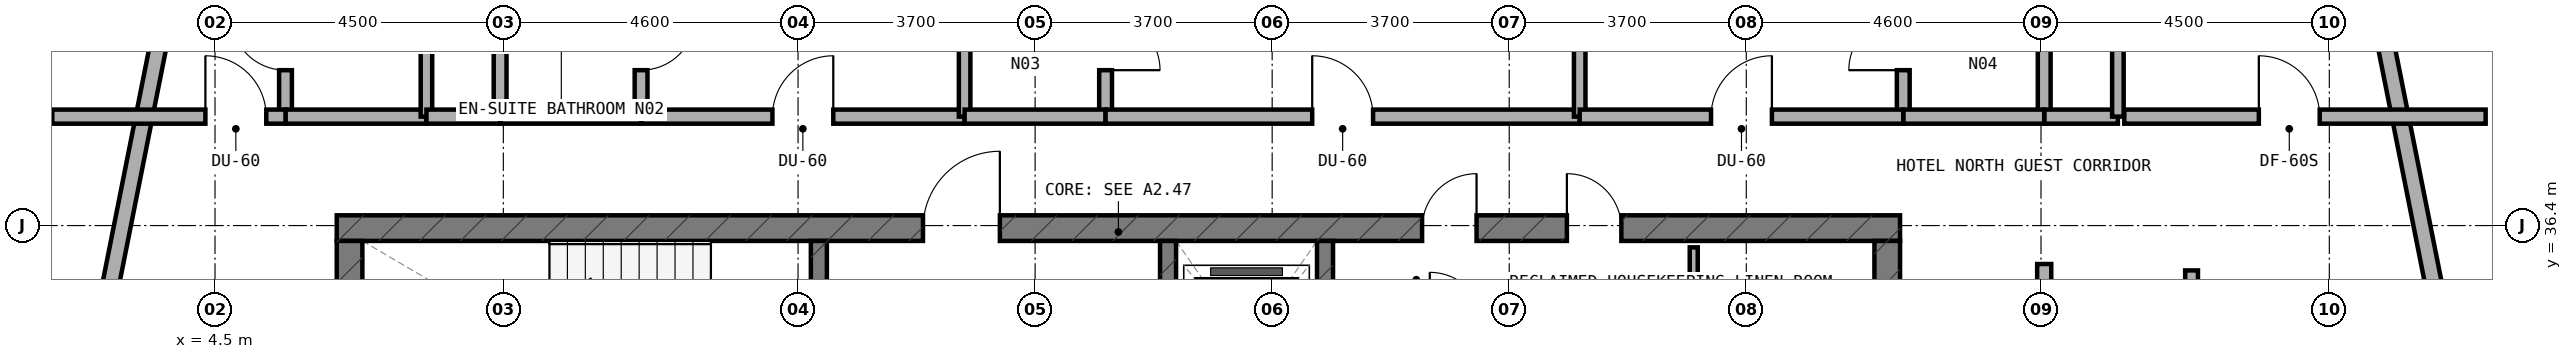
"""IFC4 building model, lengths in metres.
Left out: names, types, materials, properties, quantities, classifications, styles, units other than length and angle.
Written with IfcOpenShell. Run it as: python <this file> out.ifc"""

import sys

from ifc_helpers import new_model, si_unit, direction, frame, frame_2d, origin, place, context, subcontext, project, spatial, rectangle, extrude, element, fill, save


model = new_model("IFC4")
c1 = context("Model", 3, precision=1e-05, world=origin(), true_north=direction((0.0, 1.0)))
c2 = subcontext(c1, "Body", "Model", "MODEL_VIEW")
j1 = project(units=[si_unit("LENGTHUNIT", "METRE"), si_unit("PLANEANGLEUNIT", "RADIAN")], contexts=[c1])
p1 = place(None, origin())
s1 = spatial("IfcSite", under=j1, at=p1, CompositionType="ELEMENT")
p2 = place(p1, origin())
s2 = spatial("IfcBuilding", under=s1, at=p2, CompositionType="ELEMENT")
p3 = place(p2, frame((0.0, 0.0, 220.7)))
s3 = spatial("IfcBuildingStorey", under=s2, at=p3, CompositionType="ELEMENT", Elevation=220.7)
p4 = place(p3, frame((6.4, 36.36, 0.0), z_axis=(0.0, 0.0, 1.0), x_axis=(1.0, 0.0, 0.0)))
e1 = element("IfcWall", 1, at=p4, inside=s3, PredefinedType="SHEAR", context=c2, shape_type="SweptSolid", body=[
    extrude(rectangle(XDim=24.4, YDim=0.4, at=frame_2d((12.2, 0.0))), origin(), (0.0, 0.0, 1.0), 3.6),
])
p5 = place(p4, frame((9.15, 0.0, 0.0)))
e2 = element("IfcOpeningElement", 2, at=p5, cuts=e1, PredefinedType="OPENING", context=c2, shape_type="SweptSolid", body=[
    extrude(rectangle(XDim=1.2, YDim=2.15, at=frame_2d((0.6, 1.075))), frame((0.0, 0.21, 0.0), z_axis=(0.0, -1.0, 0.0), x_axis=(1.0, 0.0, 0.0)), (0.0, 0.0, 1.0), 0.42),
])
p6 = place(p4, frame((19.2, 0.0, 0.0)))
e3 = element("IfcOpeningElement", 3, at=p6, cuts=e1, PredefinedType="OPENING", context=c2, shape_type="SweptSolid", body=[
    extrude(rectangle(XDim=0.85, YDim=2.1, at=frame_2d((0.425, 1.05))), frame((0.0, 0.21, 0.0), z_axis=(0.0, -1.0, 0.0), x_axis=(1.0, 0.0, 0.0)), (0.0, 0.0, 1.0), 0.42),
])
p7 = place(p4, frame((16.94, 0.0, 0.0)))
e4 = element("IfcOpeningElement", 4, at=p7, cuts=e1, PredefinedType="OPENING", context=c2, shape_type="SweptSolid", body=[
    extrude(rectangle(XDim=0.85, YDim=2.1, at=frame_2d((0.425, 1.05))), frame((0.0, 0.21, 0.0), z_axis=(0.0, -1.0, 0.0), x_axis=(1.0, 0.0, 0.0)), (0.0, 0.0, 1.0), 0.42),
])
for number, where, z_axis, x_axis in (
    (5, (6.6, 33.0, 0.0), (0.0, 0.0, 1.0), (0.0, 1.0, 0.0)),
    (6, (30.6, 33.0, 0.0), (0.0, 0.0, 1.0), (0.0, 1.0, 0.0)),
):
    element("IfcWall", number, at=place(p3, frame(where, z_axis=z_axis, x_axis=x_axis)), inside=s3, PredefinedType="SHEAR", context=c2, shape_type="SweptSolid", body=[
        extrude(rectangle(XDim=3.16, YDim=0.4, at=frame_2d((1.58, 0.0))), origin(), (0.0, 0.0, 1.0), 3.6),
    ])
p8 = place(p3, frame((13.925, 33.0, 0.0), z_axis=(0.0, 0.0, 1.0), x_axis=(0.0, 1.0, 0.0)))
e7 = element("IfcWall", 7, at=p8, inside=s3, PredefinedType="STANDARD", context=c2, shape_type="SweptSolid", body=[
    extrude(rectangle(XDim=3.16, YDim=0.25, at=frame_2d((1.58, 0.0))), origin(), (0.0, 0.0, 1.0), 3.32),
])
p9 = place(p8, frame((0.98, 0.0, 0.0)))
e8 = element("IfcOpeningElement", 8, at=p9, cuts=e7, PredefinedType="OPENING", context=c2, shape_type="SweptSolid", body=[
    extrude(rectangle(XDim=1.1, YDim=2.15, at=frame_2d((0.55, 1.075))), frame((0.0, 0.135, 0.0), z_axis=(0.0, -1.0, 0.0), x_axis=(1.0, 0.0, 0.0)), (0.0, 0.0, 1.0), 0.27),
])
p10 = place(p3, frame((19.375, 33.0, 0.0), z_axis=(0.0, 0.0, 1.0), x_axis=(0.0, 1.0, 0.0)))
e9 = element("IfcWall", 9, at=p10, inside=s3, PredefinedType="STANDARD", context=c2, shape_type="SweptSolid", body=[
    extrude(rectangle(XDim=3.16, YDim=0.25, at=frame_2d((1.58, 0.0))), origin(), (0.0, 0.0, 1.0), 3.32),
])
p11 = place(p10, frame((0.98, 0.0, 0.0)))
e10 = element("IfcOpeningElement", 10, at=p11, cuts=e9, PredefinedType="OPENING", context=c2, shape_type="SweptSolid", body=[
    extrude(rectangle(XDim=1.1, YDim=2.15, at=frame_2d((0.55, 1.075))), frame((0.0, 0.135, 0.0), z_axis=(0.0, -1.0, 0.0), x_axis=(1.0, 0.0, 0.0)), (0.0, 0.0, 1.0), 0.27),
])
p12 = place(p3, frame((21.825, 33.0, 0.0), z_axis=(0.0, 0.0, 1.0), x_axis=(0.0, 1.0, 0.0)))
e11 = element("IfcWall", 11, at=p12, inside=s3, PredefinedType="STANDARD", context=c2, shape_type="SweptSolid", body=[
    extrude(rectangle(XDim=3.16, YDim=0.25, at=frame_2d((1.58, 0.0))), origin(), (0.0, 0.0, 1.0), 3.32),
])
p13 = place(p3, frame((40.084, 30.681, 0.0), z_axis=(0.0, 0.0, 1.0), x_axis=(-0.195291715883, 0.980745199176, 0.0)))
e12 = element("IfcWall", 12, at=p13, inside=s3, PredefinedType="STANDARD", context=c2, shape_type="SweptSolid", body=[
    extrude(rectangle(XDim=8.771, YDim=0.26, at=frame_2d((4.385, 0.0))), origin(), (0.0, 0.0, 1.0), 3.32),
])
p14 = place(p13, frame((2.67, 0.0, 0.85)))
e13 = element("IfcOpeningElement", 13, at=p14, cuts=e12, PredefinedType="OPENING", context=c2, shape_type="SweptSolid", body=[
    extrude(rectangle(XDim=2.1, YDim=1.5, at=frame_2d((1.05, 0.75))), frame((0.0, 0.14, 0.0), z_axis=(0.0, -1.0, 0.0), x_axis=(1.0, 0.0, 0.0)), (0.0, 0.0, 1.0), 0.28),
])
p15 = place(p3, frame((3.629, 39.283, 0.0), z_axis=(0.0, 0.0, 1.0), x_axis=(-0.195291715883, -0.980745199176, 0.0)))
e14 = element("IfcWall", 14, at=p15, inside=s3, PredefinedType="STANDARD", context=c2, shape_type="SweptSolid", body=[
    extrude(rectangle(XDim=8.771, YDim=0.26, at=frame_2d((4.385, 0.0))), origin(), (0.0, 0.0, 1.0), 3.32),
])
p16 = place(p15, frame((4.0, 0.0, 0.85)))
e15 = element("IfcOpeningElement", 15, at=p16, cuts=e14, PredefinedType="OPENING", context=c2, shape_type="SweptSolid", body=[
    extrude(rectangle(XDim=2.1, YDim=1.5, at=frame_2d((1.05, 0.75))), frame((0.0, 0.14, 0.0), z_axis=(0.0, -1.0, 0.0), x_axis=(1.0, 0.0, 0.0)), (0.0, 0.0, 1.0), 0.28),
])
p17 = place(p3, frame((27.58, 33.1, 0.0), z_axis=(0.0, 0.0, 1.0), x_axis=(0.0, 1.0, 0.0)))
e16 = element("IfcWall", 16, at=p17, inside=s3, PredefinedType="PARTITIONING", context=c2, shape_type="SweptSolid", body=[
    extrude(rectangle(XDim=2.96, YDim=0.125, at=frame_2d((1.48, 0.0))), origin(), (0.0, 0.0, 1.0), 3.32),
])
p18 = place(p17, frame((1.055, 0.0, 0.0)))
e17 = element("IfcOpeningElement", 17, at=p18, cuts=e16, PredefinedType="OPENING", context=c2, shape_type="SweptSolid", body=[
    extrude(rectangle(XDim=0.85, YDim=2.1, at=frame_2d((0.425, 1.05))), frame((0.0, 0.073, 0.0), z_axis=(0.0, -1.0, 0.0), x_axis=(1.0, 0.0, 0.0)), (0.0, 0.0, 1.0), 0.145),
])
p19 = place(p3, frame((5.6, 38.2, 0.0), z_axis=(0.0, 0.0, 1.0), x_axis=(0.0, 1.0, 0.0)))
e18 = element("IfcWall", 18, at=p19, inside=s3, PredefinedType="PLUMBINGWALL", context=c2, shape_type="SweptSolid", body=[
    extrude(rectangle(XDim=2.1, YDim=0.2, at=frame_2d((1.05, 0.0))), origin(), (0.0, 0.0, 1.0), 3.32),
])
p20 = place(p19, frame((0.625, 0.0, 0.0)))
e19 = element("IfcOpeningElement", 19, at=p20, cuts=e18, PredefinedType="OPENING", context=c2, shape_type="SweptSolid", body=[
    extrude(rectangle(XDim=0.85, YDim=2.1, at=frame_2d((0.425, 1.05))), frame((0.0, 0.11, 0.0), z_axis=(0.0, -1.0, 0.0), x_axis=(1.0, 0.0, 0.0)), (0.0, 0.0, 1.0), 0.22),
])
p21 = place(p3, frame((5.6, 38.1, 0.0), z_axis=(0.0, 0.0, 1.0), x_axis=(1.0, 0.0, 0.0)))
e20 = element("IfcWall", 20, at=p21, inside=s3, PredefinedType="SOLIDWALL", context=c2, shape_type="SweptSolid", body=[
    extrude(rectangle(XDim=2.2, YDim=0.22, at=frame_2d((1.1, 0.0))), origin(), (0.0, 0.0, 1.0), 2.695),
])
p22 = place(p3, frame((1.96, 38.1, 0.0), z_axis=(0.0, 0.0, 1.0), x_axis=(1.0, 0.0, 0.0)))
e21 = element("IfcWall", 21, at=p22, inside=s3, PredefinedType="SOLIDWALL", context=c2, shape_type="SweptSolid", body=[
    extrude(rectangle(XDim=3.64, YDim=0.22, at=frame_2d((1.82, 0.0))), origin(), (0.0, 0.0, 1.0), 3.32),
])
p23 = place(p22, frame((2.39, 0.0, 0.0)))
e22 = element("IfcOpeningElement", 22, at=p23, cuts=e21, PredefinedType="OPENING", context=c2, shape_type="SweptSolid", body=[
    extrude(rectangle(XDim=0.95, YDim=2.1, at=frame_2d((0.475, 1.05))), frame((0.0, 0.12, 0.0), z_axis=(0.0, -1.0, 0.0), x_axis=(1.0, 0.0, 0.0)), (0.0, 0.0, 1.0), 0.24),
])
p24 = place(p3, frame((7.8, 38.1, 0.0), z_axis=(0.0, 0.0, 1.0), x_axis=(0.0, 1.0, 0.0)))
e23 = element("IfcWall", 23, at=p24, inside=s3, PredefinedType="SOLIDWALL", context=c2, shape_type="SweptSolid", body=[
    extrude(rectangle(XDim=4.558, YDim=0.18, at=frame_2d((2.279, 0.0))), origin(), (0.0, 0.0, 1.0), 2.695),
])
p25 = place(p3, frame((11.15, 38.2, 0.0), z_axis=(0.0, 0.0, 1.0), x_axis=(0.0, 1.0, 0.0)))
e24 = element("IfcWall", 24, at=p25, inside=s3, PredefinedType="PLUMBINGWALL", context=c2, shape_type="SweptSolid", body=[
    extrude(rectangle(XDim=2.1, YDim=0.2, at=frame_2d((1.05, 0.0))), origin(), (0.0, 0.0, 1.0), 3.015),
])
p26 = place(p25, frame((0.625, 0.0, 0.0)))
e25 = element("IfcOpeningElement", 25, at=p26, cuts=e24, PredefinedType="OPENING", context=c2, shape_type="SweptSolid", body=[
    extrude(rectangle(XDim=0.85, YDim=2.1, at=frame_2d((0.425, 1.05))), frame((0.0, 0.11, 0.0), z_axis=(0.0, -1.0, 0.0), x_axis=(1.0, 0.0, 0.0)), (0.0, 0.0, 1.0), 0.22),
])
p27 = place(p3, frame((8.95, 38.2, 0.0), z_axis=(0.0, 0.0, 1.0), x_axis=(0.0, 1.0, 0.0)))
e26 = element("IfcWall", 26, at=p27, inside=s3, PredefinedType="PLUMBINGWALL", context=c2, shape_type="SweptSolid", body=[
    extrude(rectangle(XDim=2.1, YDim=0.2, at=frame_2d((1.05, 0.0))), origin(), (0.0, 0.0, 1.0), 3.015),
])
p28 = place(p3, frame((7.8, 38.1, 0.0), z_axis=(0.0, 0.0, 1.0), x_axis=(1.0, 0.0, 0.0)))
e27 = element("IfcWall", 27, at=p28, inside=s3, PredefinedType="SOLIDWALL", context=c2, shape_type="SweptSolid", body=[
    extrude(rectangle(XDim=1.15, YDim=0.22, at=frame_2d((0.575, 0.0))), origin(), (0.0, 0.0, 1.0), 2.695),
])
p29 = place(p3, frame((8.95, 38.1, 0.0), z_axis=(0.0, 0.0, 1.0), x_axis=(1.0, 0.0, 0.0)))
e28 = element("IfcWall", 28, at=p29, inside=s3, PredefinedType="SOLIDWALL", context=c2, shape_type="SweptSolid", body=[
    extrude(rectangle(XDim=2.2, YDim=0.22, at=frame_2d((1.1, 0.0))), origin(), (0.0, 0.0, 1.0), 3.32),
])
p30 = place(p3, frame((11.15, 38.1, 0.0), z_axis=(0.0, 0.0, 1.0), x_axis=(1.0, 0.0, 0.0)))
e29 = element("IfcWall", 29, at=p30, inside=s3, PredefinedType="SOLIDWALL", context=c2, shape_type="SweptSolid", body=[
    extrude(rectangle(XDim=5.05, YDim=0.22, at=frame_2d((2.525, 0.0))), origin(), (0.0, 0.0, 1.0), 2.695),
])
p31 = place(p30, frame((2.05, 0.0, 0.0)))
e30 = element("IfcOpeningElement", 30, at=p31, cuts=e29, PredefinedType="OPENING", context=c2, shape_type="SweptSolid", body=[
    extrude(rectangle(XDim=0.95, YDim=2.1, at=frame_2d((0.475, 1.05))), frame((0.0, 0.12, 0.0), z_axis=(0.0, -1.0, 0.0), x_axis=(1.0, 0.0, 0.0)), (0.0, 0.0, 1.0), 0.24),
])
p32 = place(p3, frame((16.2, 38.1, 0.0), z_axis=(0.0, 0.0, 1.0), x_axis=(0.0, 1.0, 0.0)))
e31 = element("IfcWall", 31, at=p32, inside=s3, PredefinedType="SOLIDWALL", context=c2, shape_type="SweptSolid", body=[
    extrude(rectangle(XDim=6.04, YDim=0.18, at=frame_2d((3.02, 0.0))), origin(), (0.0, 0.0, 1.0), 2.695),
])
p33 = place(p3, frame((18.4, 38.2, 0.0), z_axis=(0.0, 0.0, 1.0), x_axis=(0.0, 1.0, 0.0)))
e32 = element("IfcWall", 32, at=p33, inside=s3, PredefinedType="PLUMBINGWALL", context=c2, shape_type="SweptSolid", body=[
    extrude(rectangle(XDim=2.1, YDim=0.2, at=frame_2d((1.05, 0.0))), origin(), (0.0, 0.0, 1.0), 3.025),
])
p34 = place(p33, frame((0.625, 0.0, 0.0)))
e33 = element("IfcOpeningElement", 33, at=p34, cuts=e32, PredefinedType="OPENING", context=c2, shape_type="SweptSolid", body=[
    extrude(rectangle(XDim=0.85, YDim=2.1, at=frame_2d((0.425, 1.05))), frame((0.0, 0.11, 0.0), z_axis=(0.0, -1.0, 0.0), x_axis=(1.0, 0.0, 0.0)), (0.0, 0.0, 1.0), 0.22),
])
p35 = place(p3, frame((16.2, 38.1, 0.0), z_axis=(0.0, 0.0, 1.0), x_axis=(1.0, 0.0, 0.0)))
e34 = element("IfcWall", 34, at=p35, inside=s3, PredefinedType="SOLIDWALL", context=c2, shape_type="SweptSolid", body=[
    extrude(rectangle(XDim=2.2, YDim=0.22, at=frame_2d((1.1, 0.0))), origin(), (0.0, 0.0, 1.0), 2.695),
])
p36 = place(p3, frame((18.4, 38.1, 0.0), z_axis=(0.0, 0.0, 1.0), x_axis=(1.0, 0.0, 0.0)))
e35 = element("IfcWall", 35, at=p36, inside=s3, PredefinedType="SOLIDWALL", context=c2, shape_type="SweptSolid", body=[
    extrude(rectangle(XDim=7.4, YDim=0.22, at=frame_2d((3.7, 0.0))), origin(), (0.0, 0.0, 1.0), 2.695),
])
p37 = place(p36, frame((3.225, 0.0, 0.0)))
e36 = element("IfcOpeningElement", 36, at=p37, cuts=e35, PredefinedType="OPENING", context=c2, shape_type="SweptSolid", body=[
    extrude(rectangle(XDim=0.95, YDim=2.1, at=frame_2d((0.475, 1.05))), frame((0.0, 0.12, 0.0), z_axis=(0.0, -1.0, 0.0), x_axis=(1.0, 0.0, 0.0)), (0.0, 0.0, 1.0), 0.24),
])
p38 = place(p3, frame((25.8, 38.1, 0.0), z_axis=(0.0, 0.0, 1.0), x_axis=(0.0, 1.0, 0.0)))
e37 = element("IfcWall", 37, at=p38, inside=s3, PredefinedType="SOLIDWALL", context=c2, shape_type="SweptSolid", body=[
    extrude(rectangle(XDim=6.04, YDim=0.18, at=frame_2d((3.02, 0.0))), origin(), (0.0, 0.0, 1.0), 2.695),
])
p39 = place(p3, frame((30.85, 38.2, 0.0), z_axis=(0.0, 0.0, 1.0), x_axis=(0.0, 1.0, 0.0)))
e38 = element("IfcWall", 38, at=p39, inside=s3, PredefinedType="PLUMBINGWALL", context=c2, shape_type="SweptSolid", body=[
    extrude(rectangle(XDim=2.1, YDim=0.2, at=frame_2d((1.05, 0.0))), origin(), (0.0, 0.0, 1.0), 3.015),
])
p40 = place(p39, frame((0.625, 0.0, 0.0)))
e39 = element("IfcOpeningElement", 39, at=p40, cuts=e38, PredefinedType="OPENING", context=c2, shape_type="SweptSolid", body=[
    extrude(rectangle(XDim=0.85, YDim=2.1, at=frame_2d((0.425, 1.05))), frame((0.0, 0.11, 0.0), z_axis=(0.0, -1.0, 0.0), x_axis=(1.0, 0.0, 0.0)), (0.0, 0.0, 1.0), 0.22),
])
p41 = place(p3, frame((33.05, 38.2, 0.0), z_axis=(0.0, 0.0, 1.0), x_axis=(0.0, 1.0, 0.0)))
e40 = element("IfcWall", 40, at=p41, inside=s3, PredefinedType="PLUMBINGWALL", context=c2, shape_type="SweptSolid", body=[
    extrude(rectangle(XDim=2.1, YDim=0.2, at=frame_2d((1.05, 0.0))), origin(), (0.0, 0.0, 1.0), 3.015),
])
p42 = place(p3, frame((33.05, 38.1, 0.0), z_axis=(0.0, 0.0, 1.0), x_axis=(1.0, 0.0, 0.0)))
e41 = element("IfcWall", 41, at=p42, inside=s3, PredefinedType="SOLIDWALL", context=c2, shape_type="SweptSolid", body=[
    extrude(rectangle(XDim=1.15, YDim=0.22, at=frame_2d((0.575, 0.0))), origin(), (0.0, 0.0, 1.0), 2.695),
])
p43 = place(p3, frame((30.85, 38.1, 0.0), z_axis=(0.0, 0.0, 1.0), x_axis=(1.0, 0.0, 0.0)))
e42 = element("IfcWall", 42, at=p43, inside=s3, PredefinedType="SOLIDWALL", context=c2, shape_type="SweptSolid", body=[
    extrude(rectangle(XDim=2.2, YDim=0.22, at=frame_2d((1.1, 0.0))), origin(), (0.0, 0.0, 1.0), 3.32),
])
p44 = place(p3, frame((25.8, 38.1, 0.0), z_axis=(0.0, 0.0, 1.0), x_axis=(1.0, 0.0, 0.0)))
e43 = element("IfcWall", 43, at=p44, inside=s3, PredefinedType="SOLIDWALL", context=c2, shape_type="SweptSolid", body=[
    extrude(rectangle(XDim=5.05, YDim=0.22, at=frame_2d((2.525, 0.0))), origin(), (0.0, 0.0, 1.0), 2.695),
])
p45 = place(p44, frame((2.05, 0.0, 0.0)))
e44 = element("IfcOpeningElement", 44, at=p45, cuts=e43, PredefinedType="OPENING", context=c2, shape_type="SweptSolid", body=[
    extrude(rectangle(XDim=0.95, YDim=2.1, at=frame_2d((0.475, 1.05))), frame((0.0, 0.12, 0.0), z_axis=(0.0, -1.0, 0.0), x_axis=(1.0, 0.0, 0.0)), (0.0, 0.0, 1.0), 0.24),
])
p46 = place(p3, frame((34.2, 38.1, 0.0), z_axis=(0.0, 0.0, 1.0), x_axis=(0.0, 1.0, 0.0)))
e45 = element("IfcWall", 45, at=p46, inside=s3, PredefinedType="SOLIDWALL", context=c2, shape_type="SweptSolid", body=[
    extrude(rectangle(XDim=4.558, YDim=0.18, at=frame_2d((2.279, 0.0))), origin(), (0.0, 0.0, 1.0), 2.695),
])
p47 = place(p3, frame((34.3, 38.1, 0.0), z_axis=(0.0, 0.0, 1.0), x_axis=(1.0, 0.0, 0.0)))
e46 = element("IfcWall", 46, at=p47, inside=s3, PredefinedType="SOLIDWALL", context=c2, shape_type="SweptSolid", body=[
    extrude(rectangle(XDim=5.64, YDim=0.22, at=frame_2d((2.82, 0.0))), origin(), (0.0, 0.0, 1.0), 3.015),
])
p48 = place(p47, frame((2.1, 0.0, 0.0)))
e47 = element("IfcOpeningElement", 47, at=p48, cuts=e46, PredefinedType="OPENING", context=c2, shape_type="SweptSolid", body=[
    extrude(rectangle(XDim=0.95, YDim=2.1, at=frame_2d((0.475, 1.05))), frame((0.0, 0.12, 0.0), z_axis=(0.0, -1.0, 0.0), x_axis=(1.0, 0.0, 0.0)), (0.0, 0.0, 1.0), 0.24),
])
p49 = place(p3, frame((35.35, 33.7, 0.0), z_axis=(0.0, 0.0, 1.0), x_axis=(0.0, 1.0, 0.0)))
e48 = element("IfcWall", 48, at=p49, inside=s3, PredefinedType="PLUMBINGWALL", context=c2, shape_type="SweptSolid", body=[
    extrude(rectangle(XDim=2.0, YDim=0.2, at=frame_2d((1.0, 0.0))), origin(), (0.0, 0.0, 1.0), 3.015),
])
p50 = place(p3, frame((33.05, 33.6, 0.0), z_axis=(0.0, 0.0, 1.0), x_axis=(0.0, 1.0, 0.0)))
e49 = element("IfcWall", 49, at=p50, inside=s3, PredefinedType="SOLIDWALL", context=c2, shape_type="SweptSolid", body=[
    extrude(rectangle(XDim=2.2, YDim=0.22, at=frame_2d((1.1, 0.0))), origin(), (0.0, 0.0, 1.0), 3.32),
])
p51 = place(p5, origin())
e50 = element("IfcDoor", 50, at=p51, inside=s3, OperationType="SINGLE_SWING_RIGHT", PredefinedType="DOOR", context=c2, shape_type="SweptSolid", body=[
    extrude(rectangle(XDim=1.2, YDim=2.15, at=frame_2d((0.6, 1.075))), frame((0.0, 0.025, 0.0), z_axis=(0.0, -1.0, 0.0), x_axis=(1.0, 0.0, 0.0)), (0.0, 0.0, 1.0), 0.05),
])
fill(e2, e50)
p52 = place(p6, origin())
e51 = element("IfcDoor", 51, at=p52, inside=s3, OperationType="SINGLE_SWING_LEFT", PredefinedType="DOOR", context=c2, shape_type="SweptSolid", body=[
    extrude(rectangle(XDim=0.85, YDim=2.1, at=frame_2d((0.425, 1.05))), frame((0.0, 0.025, 0.0), z_axis=(0.0, -1.0, 0.0), x_axis=(1.0, 0.0, 0.0)), (0.0, 0.0, 1.0), 0.05),
])
fill(e3, e51)
p53 = place(p7, origin())
e52 = element("IfcDoor", 52, at=p53, inside=s3, OperationType="SINGLE_SWING_RIGHT", PredefinedType="DOOR", context=c2, shape_type="SweptSolid", body=[
    extrude(rectangle(XDim=0.85, YDim=2.1, at=frame_2d((0.425, 1.05))), frame((0.0, 0.025, 0.0), z_axis=(0.0, -1.0, 0.0), x_axis=(1.0, 0.0, 0.0)), (0.0, 0.0, 1.0), 0.05),
])
fill(e4, e52)
p54 = place(p20, origin())
e53 = element("IfcDoor", 53, at=p54, inside=s3, OperationType="SINGLE_SWING_RIGHT", PredefinedType="DOOR", context=c2, shape_type="SweptSolid", body=[
    extrude(rectangle(XDim=0.85, YDim=2.1, at=frame_2d((0.425, 1.05))), frame((0.0, 0.025, 0.0), z_axis=(0.0, -1.0, 0.0), x_axis=(1.0, 0.0, 0.0)), (0.0, 0.0, 1.0), 0.05),
])
fill(e19, e53)
p55 = place(p23, origin())
e54 = element("IfcDoor", 54, at=p55, inside=s3, OperationType="SINGLE_SWING_LEFT", PredefinedType="DOOR", context=c2, shape_type="SweptSolid", body=[
    extrude(rectangle(XDim=0.95, YDim=2.1, at=frame_2d((0.475, 1.05))), frame((0.0, 0.025, 0.0), z_axis=(0.0, -1.0, 0.0), x_axis=(1.0, 0.0, 0.0)), (0.0, 0.0, 1.0), 0.05),
])
fill(e22, e54)
p56 = place(p26, frame((0.85, 0.0, 0.0), z_axis=(0.0, 0.0, 1.0), x_axis=(-1.0, 0.0, 0.0)))
e55 = element("IfcDoor", 55, at=p56, inside=s3, OperationType="SINGLE_SWING_LEFT", PredefinedType="DOOR", context=c2, shape_type="SweptSolid", body=[
    extrude(rectangle(XDim=0.85, YDim=2.1, at=frame_2d((0.425, 1.05))), frame((0.0, 0.025, 0.0), z_axis=(0.0, -1.0, 0.0), x_axis=(1.0, 0.0, 0.0)), (0.0, 0.0, 1.0), 0.05),
])
fill(e25, e55)
p57 = place(p31, origin())
e56 = element("IfcDoor", 56, at=p57, inside=s3, OperationType="SINGLE_SWING_RIGHT", PredefinedType="DOOR", context=c2, shape_type="SweptSolid", body=[
    extrude(rectangle(XDim=0.95, YDim=2.1, at=frame_2d((0.475, 1.05))), frame((0.0, 0.025, 0.0), z_axis=(0.0, -1.0, 0.0), x_axis=(1.0, 0.0, 0.0)), (0.0, 0.0, 1.0), 0.05),
])
fill(e30, e56)
p58 = place(p34, frame((0.85, 0.0, 0.0), z_axis=(0.0, 0.0, 1.0), x_axis=(-1.0, 0.0, 0.0)))
e57 = element("IfcDoor", 57, at=p58, inside=s3, OperationType="SINGLE_SWING_RIGHT", PredefinedType="DOOR", context=c2, shape_type="SweptSolid", body=[
    extrude(rectangle(XDim=0.85, YDim=2.1, at=frame_2d((0.425, 1.05))), frame((0.0, 0.025, 0.0), z_axis=(0.0, -1.0, 0.0), x_axis=(1.0, 0.0, 0.0)), (0.0, 0.0, 1.0), 0.05),
])
fill(e33, e57)
p59 = place(p37, origin())
e58 = element("IfcDoor", 58, at=p59, inside=s3, OperationType="SINGLE_SWING_LEFT", PredefinedType="DOOR", context=c2, shape_type="SweptSolid", body=[
    extrude(rectangle(XDim=0.95, YDim=2.1, at=frame_2d((0.475, 1.05))), frame((0.0, 0.025, 0.0), z_axis=(0.0, -1.0, 0.0), x_axis=(1.0, 0.0, 0.0)), (0.0, 0.0, 1.0), 0.05),
])
fill(e36, e58)
p60 = place(p40, origin())
e59 = element("IfcDoor", 59, at=p60, inside=s3, OperationType="SINGLE_SWING_LEFT", PredefinedType="DOOR", context=c2, shape_type="SweptSolid", body=[
    extrude(rectangle(XDim=0.85, YDim=2.1, at=frame_2d((0.425, 1.05))), frame((0.0, 0.025, 0.0), z_axis=(0.0, -1.0, 0.0), x_axis=(1.0, 0.0, 0.0)), (0.0, 0.0, 1.0), 0.05),
])
fill(e39, e59)
p61 = place(p45, origin())
e60 = element("IfcDoor", 60, at=p61, inside=s3, OperationType="SINGLE_SWING_RIGHT", PredefinedType="DOOR", context=c2, shape_type="SweptSolid", body=[
    extrude(rectangle(XDim=0.95, YDim=2.1, at=frame_2d((0.475, 1.05))), frame((0.0, 0.025, 0.0), z_axis=(0.0, -1.0, 0.0), x_axis=(1.0, 0.0, 0.0)), (0.0, 0.0, 1.0), 0.05),
])
fill(e44, e60)
p62 = place(p48, origin())
e61 = element("IfcDoor", 61, at=p62, inside=s3, OperationType="SINGLE_SWING_LEFT", PredefinedType="DOOR", context=c2, shape_type="SweptSolid", body=[
    extrude(rectangle(XDim=0.95, YDim=2.1, at=frame_2d((0.475, 1.05))), frame((0.0, 0.025, 0.0), z_axis=(0.0, -1.0, 0.0), x_axis=(1.0, 0.0, 0.0)), (0.0, 0.0, 1.0), 0.05),
])
fill(e47, e61)
save(model, sys.argv[1])
